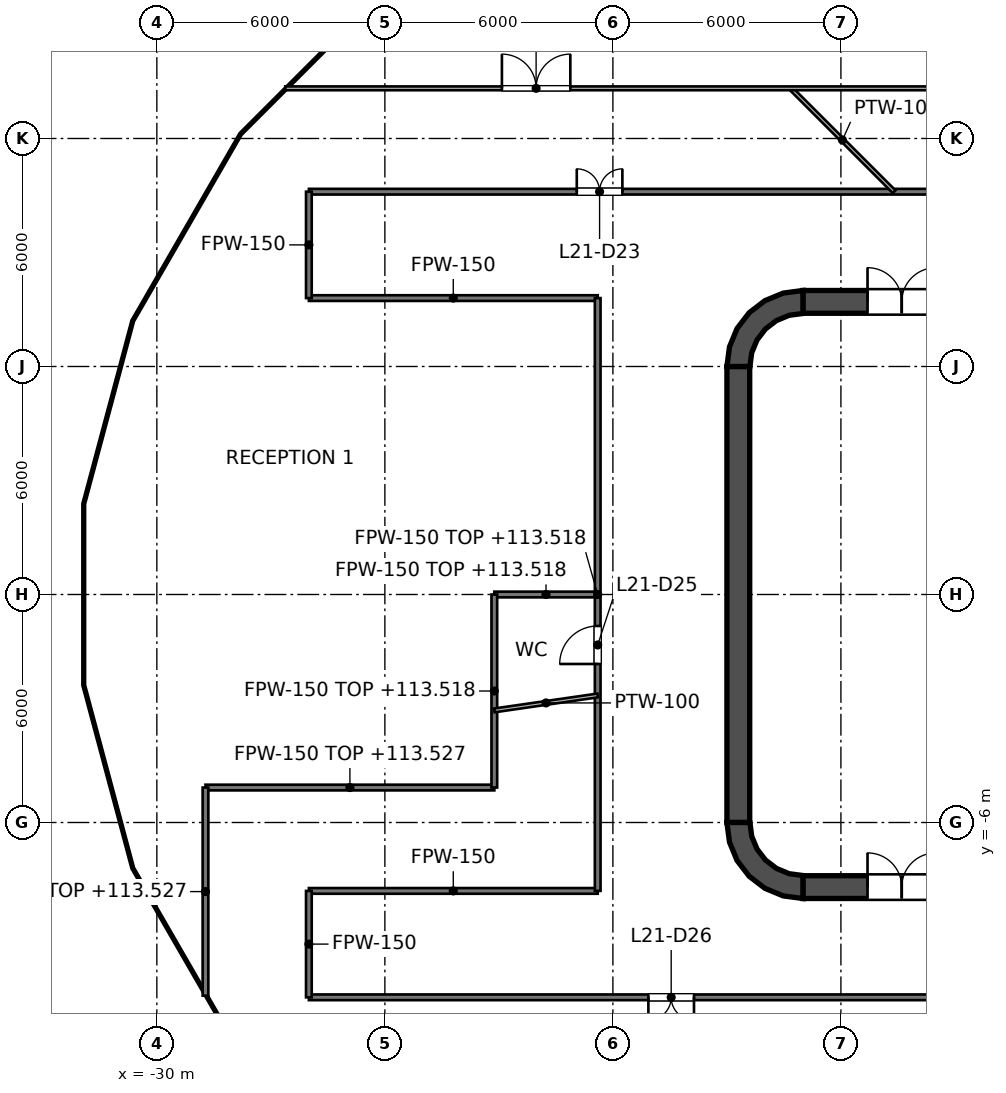
"""IFC4 building model, lengths in metres.
Left out: names, types, materials, properties, quantities, classifications, styles, units other than length and angle.
Written with IfcOpenShell. Run it as: python <this file> out.ifc"""

import sys

from ifc_helpers import new_model, si_unit, direction, frame, frame_2d, origin, place, context, subcontext, project, spatial, polyline, rectangle, outline, extrude, element, fill, save


model = new_model("IFC4")
c1 = context("Model", 3, precision=1e-05, world=origin(), true_north=direction((0.0, 1.0)))
c2 = subcontext(c1, "Body", "Model", "MODEL_VIEW")
j1 = project(units=[si_unit("LENGTHUNIT", "METRE"), si_unit("PLANEANGLEUNIT", "RADIAN")], contexts=[c1])
p1 = place(None, origin())
s1 = spatial("IfcSite", under=j1, at=p1, CompositionType="ELEMENT")
p2 = place(p1, origin())
s2 = spatial("IfcBuilding", under=s1, at=p2, CompositionType="ELEMENT")
p3 = place(p2, frame((0.0, 0.0, 110.4)))
s3 = spatial("IfcBuildingStorey", under=s2, at=p3, CompositionType="ELEMENT", Elevation=110.4)
p4 = place(p3, frame((-13.0, 7.7, 0.0), z_axis=(0.0, 0.0, 1.0), x_axis=(1.0, 0.0, 0.0)))
e1 = element("IfcWall", 1, at=p4, inside=s3, PredefinedType="SHEAR", context=c2, shape_type="SweptSolid", body=[
    extrude(rectangle(XDim=26.0, YDim=0.6, at=frame_2d((13.0, 0.0))), origin(), (0.0, 0.0, 1.0), 4.2),
])
p5 = place(p4, frame((1.7, 0.0, 0.0)))
e2 = element("IfcOpeningElement", 2, at=p5, cuts=e1, PredefinedType="OPENING", context=c2, shape_type="SweptSolid", body=[
    extrude(rectangle(XDim=1.8, YDim=2.1, at=frame_2d((0.9, 1.05))), frame((0.0, 0.3, 0.0), z_axis=(0.0, -1.0, 0.0), x_axis=(1.0, 0.0, 0.0)), (0.0, 0.0, 1.0), 0.6),
])
p6 = place(p4, frame((22.5, 0.0, 0.0)))
e3 = element("IfcOpeningElement", 3, at=p6, cuts=e1, PredefinedType="OPENING", context=c2, shape_type="SweptSolid", body=[
    extrude(rectangle(XDim=1.8, YDim=2.1, at=frame_2d((0.9, 1.05))), frame((0.0, 0.3, 0.0), z_axis=(0.0, -1.0, 0.0), x_axis=(1.0, 0.0, 0.0)), (0.0, 0.0, 1.0), 0.6),
])
p7 = place(p3, frame((-13.0, -7.7, 0.0), z_axis=(0.0, 0.0, 1.0), x_axis=(1.0, 0.0, 0.0)))
e4 = element("IfcWall", 4, at=p7, inside=s3, PredefinedType="SHEAR", context=c2, shape_type="SweptSolid", body=[
    extrude(rectangle(XDim=26.0, YDim=0.6, at=frame_2d((13.0, 0.0))), origin(), (0.0, 0.0, 1.0), 4.2),
])
p8 = place(p7, frame((1.7, 0.0, 0.0)))
e5 = element("IfcOpeningElement", 5, at=p8, cuts=e4, PredefinedType="OPENING", context=c2, shape_type="SweptSolid", body=[
    extrude(rectangle(XDim=1.8, YDim=2.1, at=frame_2d((0.9, 1.05))), frame((0.0, 0.3, 0.0), z_axis=(0.0, -1.0, 0.0), x_axis=(1.0, 0.0, 0.0)), (0.0, 0.0, 1.0), 0.6),
])
p9 = place(p7, frame((22.5, 0.0, 0.0)))
e6 = element("IfcOpeningElement", 6, at=p9, cuts=e4, PredefinedType="OPENING", context=c2, shape_type="SweptSolid", body=[
    extrude(rectangle(XDim=1.8, YDim=2.1, at=frame_2d((0.9, 1.05))), frame((0.0, 0.3, 0.0), z_axis=(0.0, -1.0, 0.0), x_axis=(1.0, 0.0, 0.0)), (0.0, 0.0, 1.0), 0.6),
])
p10 = place(p3, frame((-14.7, -6.0, 0.0), z_axis=(0.0, 0.0, 1.0), x_axis=(0.0, 1.0, 0.0)))
e7 = element("IfcWall", 7, at=p10, inside=s3, PredefinedType="SHEAR", context=c2, shape_type="SweptSolid", body=[
    extrude(rectangle(XDim=12.0, YDim=0.6, at=frame_2d((6.0, 0.0))), origin(), (0.0, 0.0, 1.0), 4.2),
])
p11 = place(p3, origin())
e8 = element("IfcWall", 8, at=p11, inside=s3, PredefinedType="SHEAR", context=c2, shape_type="SweptSolid", body=[
    extrude(outline(polyline([(-15.0, 6.0), (-14.395, 6.0), (-14.347, 6.361), (-14.208, 6.698), (-13.986, 6.986), (-13.698, 7.208), (-13.361, 7.347), (-13.0, 7.395), (-13.0, 8.0), (-13.518, 7.932), (-14.0, 7.732), (-14.414, 7.414), (-14.732, 7.0), (-14.932, 6.518), (-15.0, 6.0)])), origin(), (0.0, 0.0, 1.0), 4.2),
])
e9 = element("IfcWall", 9, at=p11, inside=s3, PredefinedType="SHEAR", context=c2, shape_type="SweptSolid", body=[
    extrude(outline(polyline([(-13.0, -8.0), (-13.0, -7.395), (-13.361, -7.347), (-13.698, -7.208), (-13.986, -6.986), (-14.208, -6.698), (-14.347, -6.361), (-14.395, -6.0), (-15.0, -6.0), (-14.932, -6.518), (-14.732, -7.0), (-14.414, -7.414), (-14.0, -7.732), (-13.518, -7.932), (-13.0, -8.0)])), origin(), (0.0, 0.0, 1.0), 4.2),
])
p12 = place(p3, frame((-11.8, -7.4, 0.0), z_axis=(0.0, 0.0, 1.0), x_axis=(0.0, 1.0, 0.0)))
e10 = element("IfcWall", 10, at=p12, inside=s3, PredefinedType="SOLIDWALL", context=c2, shape_type="SweptSolid", body=[
    extrude(rectangle(XDim=14.8, YDim=0.4, at=frame_2d((7.4, 0.0))), origin(), (0.0, 0.0, 1.0), 4.05),
])
p13 = place(p12, frame((11.2, 0.0, 0.0)))
e11 = element("IfcOpeningElement", 11, at=p13, cuts=e10, PredefinedType="OPENING", context=c2, shape_type="SweptSolid", body=[
    extrude(rectangle(XDim=1.1, YDim=2.1, at=frame_2d((0.55, 1.05))), frame((0.0, 0.2, 0.0), z_axis=(0.0, -1.0, 0.0), x_axis=(1.0, 0.0, 0.0)), (0.0, 0.0, 1.0), 0.4),
])
p14 = place(p12, frame((8.3, 0.0, 0.0)))
e12 = element("IfcOpeningElement", 12, at=p14, cuts=e10, PredefinedType="OPENING", context=c2, shape_type="SweptSolid", body=[
    extrude(rectangle(XDim=1.1, YDim=2.1, at=frame_2d((0.55, 1.05))), frame((0.0, 0.2, 0.0), z_axis=(0.0, -1.0, 0.0), x_axis=(1.0, 0.0, 0.0)), (0.0, 0.0, 1.0), 0.4),
])
p15 = place(p12, frame((5.4, 0.0, 0.0)))
e13 = element("IfcOpeningElement", 13, at=p15, cuts=e10, PredefinedType="OPENING", context=c2, shape_type="SweptSolid", body=[
    extrude(rectangle(XDim=1.1, YDim=2.1, at=frame_2d((0.55, 1.05))), frame((0.0, 0.2, 0.0), z_axis=(0.0, -1.0, 0.0), x_axis=(1.0, 0.0, 0.0)), (0.0, 0.0, 1.0), 0.4),
])
p16 = place(p12, frame((13.552, 0.0, 0.0)))
e14 = element("IfcOpeningElement", 14, at=p16, cuts=e10, PredefinedType="OPENING", context=c2, shape_type="SweptSolid", body=[
    extrude(rectangle(XDim=0.9, YDim=2.1, at=frame_2d((0.45, 1.05))), frame((0.0, 0.2, 0.0), z_axis=(0.0, -1.0, 0.0), x_axis=(1.0, 0.0, 0.0)), (0.0, 0.0, 1.0), 0.4),
])
p17 = place(p12, frame((0.347, 0.0, 0.0)))
e15 = element("IfcOpeningElement", 15, at=p17, cuts=e10, PredefinedType="OPENING", context=c2, shape_type="SweptSolid", body=[
    extrude(rectangle(XDim=0.9, YDim=2.1, at=frame_2d((0.45, 1.05))), frame((0.0, 0.2, 0.0), z_axis=(0.0, -1.0, 0.0), x_axis=(1.0, 0.0, 0.0)), (0.0, 0.0, 1.0), 0.4),
])
e16 = element("IfcWall", 16, at=p11, inside=s3, PredefinedType="SOLIDWALL", context=c2, shape_type="SweptSolid", body=[
    extrude(outline(polyline([(-12.0, -5.925), (-12.0, -5.675), (-14.15, -5.675), (-14.15, -3.025), (-12.0, -3.025), (-12.0, -2.775), (-14.15, -2.775), (-14.15, -0.125), (-12.0, -0.125), (-12.0, 0.125), (-14.15, 0.125), (-14.15, 2.775), (-12.0, 2.775), (-12.0, 3.025), (-14.15, 3.025), (-14.15, 5.675), (-12.0, 5.675), (-12.0, 5.925), (-14.15, 5.925), (-14.4, 5.925), (-14.4, 5.675), (-14.4, 3.025), (-14.4, 2.775), (-14.4, 0.125), (-14.4, -0.125), (-14.4, -2.775), (-14.4, -3.025), (-14.4, -5.675), (-14.4, -5.925), (-14.15, -5.925), (-12.0, -5.925)])), origin(), (0.0, 0.0, 1.0), 4.05),
])
p18 = place(p3, frame((-26.0, -10.6, 0.0), z_axis=(0.0, 0.0, 1.0), x_axis=(1.0, 0.0, 0.0)))
e17 = element("IfcWall", 17, at=p18, inside=s3, PredefinedType="PARTITIONING", context=c2, shape_type="SweptSolid", body=[
    extrude(rectangle(XDim=52.0, YDim=0.15, at=frame_2d((26.0, 0.0))), origin(), (0.0, 0.0, 1.0), 3.127),
])
p19 = place(p18, frame((8.934, 0.0, 0.0)))
e18 = element("IfcOpeningElement", 18, at=p19, cuts=e17, PredefinedType="OPENING", context=c2, shape_type="SweptSolid", body=[
    extrude(rectangle(XDim=1.2, YDim=2.1, at=frame_2d((0.6, 1.05))), frame((0.0, 0.075, 0.0), z_axis=(0.0, -1.0, 0.0), x_axis=(1.0, 0.0, 0.0)), (0.0, 0.0, 1.0), 0.15),
])
p20 = place(p18, frame((19.913, 0.0, 0.0)))
e19 = element("IfcOpeningElement", 19, at=p20, cuts=e17, PredefinedType="OPENING", context=c2, shape_type="SweptSolid", body=[
    extrude(rectangle(XDim=1.0, YDim=2.1, at=frame_2d((0.5, 1.05))), frame((0.0, 0.075, 0.0), z_axis=(0.0, -1.0, 0.0), x_axis=(1.0, 0.0, 0.0)), (0.0, 0.0, 1.0), 0.15),
])
p21 = place(p18, frame((21.763, 0.0, 0.0)))
e20 = element("IfcOpeningElement", 20, at=p21, cuts=e17, PredefinedType="OPENING", context=c2, shape_type="SweptSolid", body=[
    extrude(rectangle(XDim=1.0, YDim=2.1, at=frame_2d((0.5, 1.05))), frame((0.0, 0.075, 0.0), z_axis=(0.0, -1.0, 0.0), x_axis=(1.0, 0.0, 0.0)), (0.0, 0.0, 1.0), 0.15),
])
p22 = place(p18, frame((29.38, 0.0, 0.0)))
e21 = element("IfcOpeningElement", 21, at=p22, cuts=e17, PredefinedType="OPENING", context=c2, shape_type="SweptSolid", body=[
    extrude(rectangle(XDim=1.0, YDim=2.1, at=frame_2d((0.5, 1.05))), frame((0.0, 0.075, 0.0), z_axis=(0.0, -1.0, 0.0), x_axis=(1.0, 0.0, 0.0)), (0.0, 0.0, 1.0), 0.15),
])
p23 = place(p18, frame((41.202, 0.0, 0.0)))
e22 = element("IfcOpeningElement", 22, at=p23, cuts=e17, PredefinedType="OPENING", context=c2, shape_type="SweptSolid", body=[
    extrude(rectangle(XDim=1.0, YDim=2.1, at=frame_2d((0.5, 1.05))), frame((0.0, 0.075, 0.0), z_axis=(0.0, -1.0, 0.0), x_axis=(1.0, 0.0, 0.0)), (0.0, 0.0, 1.0), 0.15),
])
p24 = place(p3, frame((-26.0, -7.8, 0.0), z_axis=(0.0, 0.0, 1.0), x_axis=(1.0, 0.0, 0.0)))
e23 = element("IfcWall", 23, at=p24, inside=s3, PredefinedType="PARTITIONING", context=c2, shape_type="SweptSolid", body=[
    extrude(rectangle(XDim=7.6, YDim=0.15, at=frame_2d((3.8, 0.0))), origin(), (0.0, 0.0, 1.0), 3.195),
])
p25 = place(p3, frame((-28.72, -5.08, 0.0), z_axis=(0.0, 0.0, 1.0), x_axis=(1.0, 0.0, 0.0)))
e24 = element("IfcWall", 24, at=p25, inside=s3, PredefinedType="PARTITIONING", context=c2, shape_type="SweptSolid", body=[
    extrude(rectangle(XDim=7.6, YDim=0.15, at=frame_2d((3.8, 0.0))), origin(), (0.0, 0.0, 1.0), 3.127),
])
p26 = place(p3, frame((-21.12, 0.0, 0.0), z_axis=(0.0, 0.0, 1.0), x_axis=(1.0, 0.0, 0.0)))
e25 = element("IfcWall", 25, at=p26, inside=s3, PredefinedType="PARTITIONING", context=c2, shape_type="SweptSolid", body=[
    extrude(rectangle(XDim=2.72, YDim=0.15, at=frame_2d((1.36, 0.0))), origin(), (0.0, 0.0, 1.0), 3.118),
])
p27 = place(p3, frame((-26.0, 7.8, 0.0), z_axis=(0.0, 0.0, 1.0), x_axis=(1.0, 0.0, 0.0)))
e26 = element("IfcWall", 26, at=p27, inside=s3, PredefinedType="PARTITIONING", context=c2, shape_type="SweptSolid", body=[
    extrude(rectangle(XDim=7.6, YDim=0.15, at=frame_2d((3.8, 0.0))), origin(), (0.0, 0.0, 1.0), 3.195),
])
p28 = place(p3, frame((-26.0, 10.6, 0.0), z_axis=(0.0, 0.0, 1.0), x_axis=(1.0, 0.0, 0.0)))
e27 = element("IfcWall", 27, at=p28, inside=s3, PredefinedType="PARTITIONING", context=c2, shape_type="SweptSolid", body=[
    extrude(rectangle(XDim=52.0, YDim=0.15, at=frame_2d((26.0, 0.0))), origin(), (0.0, 0.0, 1.0), 3.127),
])
p29 = place(p28, frame((18.729, 0.0, 0.0)))
e28 = element("IfcOpeningElement", 28, at=p29, cuts=e27, PredefinedType="OPENING", context=c2, shape_type="SweptSolid", body=[
    extrude(rectangle(XDim=1.0, YDim=2.1, at=frame_2d((0.5, 1.05))), frame((0.0, 0.075, 0.0), z_axis=(0.0, -1.0, 0.0), x_axis=(1.0, 0.0, 0.0)), (0.0, 0.0, 1.0), 0.15),
])
p30 = place(p28, frame((7.05, 0.0, 0.0)))
e29 = element("IfcOpeningElement", 29, at=p30, cuts=e27, PredefinedType="OPENING", context=c2, shape_type="SweptSolid", body=[
    extrude(rectangle(XDim=1.2, YDim=2.1, at=frame_2d((0.6, 1.05))), frame((0.0, 0.075, 0.0), z_axis=(0.0, -1.0, 0.0), x_axis=(1.0, 0.0, 0.0)), (0.0, 0.0, 1.0), 0.15),
])
p31 = place(p28, frame((40.464, 0.0, 0.0)))
e30 = element("IfcOpeningElement", 30, at=p31, cuts=e27, PredefinedType="OPENING", context=c2, shape_type="SweptSolid", body=[
    extrude(rectangle(XDim=1.0, YDim=2.1, at=frame_2d((0.5, 1.05))), frame((0.0, 0.075, 0.0), z_axis=(0.0, -1.0, 0.0), x_axis=(1.0, 0.0, 0.0)), (0.0, 0.0, 1.0), 0.15),
])
p32 = place(p28, frame((27.09, 0.0, 0.0)))
e31 = element("IfcOpeningElement", 31, at=p32, cuts=e27, PredefinedType="OPENING", context=c2, shape_type="SweptSolid", body=[
    extrude(rectangle(XDim=1.0, YDim=2.1, at=frame_2d((0.5, 1.05))), frame((0.0, 0.075, 0.0), z_axis=(0.0, -1.0, 0.0), x_axis=(1.0, 0.0, 0.0)), (0.0, 0.0, 1.0), 0.15),
])
p33 = place(p3, frame((-18.4, -7.8, 0.0), z_axis=(0.0, 0.0, 1.0), x_axis=(0.0, 1.0, 0.0)))
e32 = element("IfcWall", 32, at=p33, inside=s3, PredefinedType="PARTITIONING", context=c2, shape_type="SweptSolid", body=[
    extrude(rectangle(XDim=15.6, YDim=0.15, at=frame_2d((7.8, 0.0))), origin(), (0.0, 0.0, 1.0), 3.118),
])
p34 = place(p33, frame((5.971, 0.0, 0.0)))
e33 = element("IfcOpeningElement", 33, at=p34, cuts=e32, PredefinedType="OPENING", context=c2, shape_type="SweptSolid", body=[
    extrude(rectangle(XDim=1.0, YDim=2.1, at=frame_2d((0.5, 1.05))), frame((0.0, 0.075, 0.0), z_axis=(0.0, -1.0, 0.0), x_axis=(1.0, 0.0, 0.0)), (0.0, 0.0, 1.0), 0.15),
])
p35 = place(p3, frame((-21.12, -5.08, 0.0), z_axis=(0.0, 0.0, 1.0), x_axis=(0.0, 1.0, 0.0)))
e34 = element("IfcWall", 34, at=p35, inside=s3, PredefinedType="PARTITIONING", context=c2, shape_type="SweptSolid", body=[
    extrude(rectangle(XDim=5.08, YDim=0.15, at=frame_2d((2.54, 0.0))), origin(), (0.0, 0.0, 1.0), 3.118),
])
for number, where, z_axis, x_axis in (
    (35, (-26.0, -10.6, 0.0), (0.0, 0.0, 1.0), (0.0, 1.0, 0.0)),
    (36, (-26.0, 7.8, 0.0), (0.0, 0.0, 1.0), (0.0, 1.0, 0.0)),
):
    element("IfcWall", number, at=place(p3, frame(where, z_axis=z_axis, x_axis=x_axis)), inside=s3, PredefinedType="PARTITIONING", context=c2, shape_type="SweptSolid", body=[
        extrude(rectangle(XDim=2.8, YDim=0.15, at=frame_2d((1.4, 0.0))), origin(), (0.0, 0.0, 1.0), 3.195),
    ])
p36 = place(p3, frame((-28.72, -10.556, 0.0), z_axis=(0.0, 0.0, 1.0), x_axis=(0.0, 1.0, 0.0)))
e37 = element("IfcWall", 37, at=p36, inside=s3, PredefinedType="PARTITIONING", context=c2, shape_type="SweptSolid", body=[
    extrude(rectangle(XDim=5.476, YDim=0.15, at=frame_2d((2.738, 0.0))), origin(), (0.0, 0.0, 1.0), 3.127),
])
p37 = place(p3, frame((-13.32, 13.32, 0.0), z_axis=(0.0, 0.0, 1.0), x_axis=(0.707106781187, -0.707106781187, 0.0)))
e38 = element("IfcWall", 38, at=p37, inside=s3, PredefinedType="PARTITIONING", context=c2, shape_type="SweptSolid", body=[
    extrude(rectangle(XDim=3.847, YDim=0.1, at=frame_2d((1.923, 0.0))), origin(), (0.0, 0.0, 1.0), 3.127),
])
p38 = place(p3, frame((-26.621, 13.32, 0.0), z_axis=(0.0, 0.0, 1.0), x_axis=(1.0, 0.0, 0.0)))
e39 = element("IfcWall", 39, at=p38, inside=s3, PredefinedType="PARTITIONING", context=c2, shape_type="SweptSolid", body=[
    extrude(rectangle(XDim=53.242, YDim=0.1, at=frame_2d((26.621, 0.0))), origin(), (0.0, 0.0, 1.0), 3.127),
])
p39 = place(p38, frame((5.7, 0.0, 0.0)))
e40 = element("IfcOpeningElement", 40, at=p39, cuts=e39, PredefinedType="OPENING", context=c2, shape_type="SweptSolid", body=[
    extrude(rectangle(XDim=1.8, YDim=2.1, at=frame_2d((0.9, 1.05))), frame((0.0, 0.05, 0.0), z_axis=(0.0, -1.0, 0.0), x_axis=(1.0, 0.0, 0.0)), (0.0, 0.0, 1.0), 0.1),
])
p40 = place(p38, frame((43.326, 0.0, 0.0)))
e41 = element("IfcOpeningElement", 41, at=p40, cuts=e39, PredefinedType="OPENING", context=c2, shape_type="SweptSolid", body=[
    extrude(rectangle(XDim=0.9, YDim=2.1, at=frame_2d((0.45, 1.05))), frame((0.0, 0.05, 0.0), z_axis=(0.0, -1.0, 0.0), x_axis=(1.0, 0.0, 0.0)), (0.0, 0.0, 1.0), 0.1),
])
p41 = place(p38, frame((27.781, 0.0, 0.0)))
e42 = element("IfcOpeningElement", 42, at=p41, cuts=e39, PredefinedType="OPENING", context=c2, shape_type="SweptSolid", body=[
    extrude(rectangle(XDim=1.8, YDim=2.1, at=frame_2d((0.9, 1.05))), frame((0.0, 0.05, 0.0), z_axis=(0.0, -1.0, 0.0), x_axis=(1.0, 0.0, 0.0)), (0.0, 0.0, 1.0), 0.1),
])
p42 = place(p3, frame((-21.12, -3.05, 0.0), z_axis=(0.0, 0.0, 1.0), x_axis=(0.989720814385, 0.143012969948, 0.0)))
e43 = element("IfcWall", 43, at=p42, inside=s3, PredefinedType="PARTITIONING", context=c2, shape_type="SweptSolid", body=[
    extrude(rectangle(XDim=2.749, YDim=0.1, at=frame_2d((1.374, 0.0))), origin(), (0.0, 0.0, 1.0), 3.127),
])
p43 = place(p13, origin())
e44 = element("IfcDoor", 44, at=p43, inside=s3, OperationType="DOUBLE_DOOR_SLIDING", PredefinedType="DOOR", context=c2, shape_type="SweptSolid", body=[
    extrude(rectangle(XDim=1.1, YDim=2.1, at=frame_2d((0.55, 1.05))), frame((0.0, 0.025, 0.0), z_axis=(0.0, -1.0, 0.0), x_axis=(1.0, 0.0, 0.0)), (0.0, 0.0, 1.0), 0.05),
])
fill(e11, e44)
p44 = place(p14, origin())
e45 = element("IfcDoor", 45, at=p44, inside=s3, OperationType="DOUBLE_DOOR_SLIDING", PredefinedType="DOOR", context=c2, shape_type="SweptSolid", body=[
    extrude(rectangle(XDim=1.1, YDim=2.1, at=frame_2d((0.55, 1.05))), frame((0.0, 0.025, 0.0), z_axis=(0.0, -1.0, 0.0), x_axis=(1.0, 0.0, 0.0)), (0.0, 0.0, 1.0), 0.05),
])
fill(e12, e45)
p45 = place(p15, origin())
e46 = element("IfcDoor", 46, at=p45, inside=s3, OperationType="DOUBLE_DOOR_SLIDING", PredefinedType="DOOR", context=c2, shape_type="SweptSolid", body=[
    extrude(rectangle(XDim=1.1, YDim=2.1, at=frame_2d((0.55, 1.05))), frame((0.0, 0.025, 0.0), z_axis=(0.0, -1.0, 0.0), x_axis=(1.0, 0.0, 0.0)), (0.0, 0.0, 1.0), 0.05),
])
fill(e13, e46)
p46 = place(p16, origin())
e47 = element("IfcDoor", 47, at=p46, inside=s3, OperationType="SINGLE_SWING_LEFT", PredefinedType="DOOR", context=c2, shape_type="SweptSolid", body=[
    extrude(rectangle(XDim=0.9, YDim=2.1, at=frame_2d((0.45, 1.05))), frame((0.0, 0.025, 0.0), z_axis=(0.0, -1.0, 0.0), x_axis=(1.0, 0.0, 0.0)), (0.0, 0.0, 1.0), 0.05),
])
fill(e14, e47)
p47 = place(p17, origin())
e48 = element("IfcDoor", 48, at=p47, inside=s3, OperationType="SINGLE_SWING_LEFT", PredefinedType="DOOR", context=c2, shape_type="SweptSolid", body=[
    extrude(rectangle(XDim=0.9, YDim=2.1, at=frame_2d((0.45, 1.05))), frame((0.0, 0.025, 0.0), z_axis=(0.0, -1.0, 0.0), x_axis=(1.0, 0.0, 0.0)), (0.0, 0.0, 1.0), 0.05),
])
fill(e15, e48)
p48 = place(p5, origin())
e49 = element("IfcDoor", 49, at=p48, inside=s3, OperationType="DOUBLE_DOOR_SINGLE_SWING", PredefinedType="DOOR", context=c2, shape_type="SweptSolid", body=[
    extrude(rectangle(XDim=1.8, YDim=2.1, at=frame_2d((0.9, 1.05))), frame((0.0, 0.025, 0.0), z_axis=(0.0, -1.0, 0.0), x_axis=(1.0, 0.0, 0.0)), (0.0, 0.0, 1.0), 0.05),
])
fill(e2, e49)
p49 = place(p8, origin())
e50 = element("IfcDoor", 50, at=p49, inside=s3, OperationType="DOUBLE_DOOR_SINGLE_SWING", PredefinedType="DOOR", context=c2, shape_type="SweptSolid", body=[
    extrude(rectangle(XDim=1.8, YDim=2.1, at=frame_2d((0.9, 1.05))), frame((0.0, 0.025, 0.0), z_axis=(0.0, -1.0, 0.0), x_axis=(1.0, 0.0, 0.0)), (0.0, 0.0, 1.0), 0.05),
])
fill(e5, e50)
p50 = place(p30, origin())
e51 = element("IfcDoor", 51, at=p50, inside=s3, OperationType="DOUBLE_DOOR_SINGLE_SWING", PredefinedType="DOOR", context=c2, shape_type="SweptSolid", body=[
    extrude(rectangle(XDim=1.2, YDim=2.1, at=frame_2d((0.6, 1.05))), frame((0.0, 0.025, 0.0), z_axis=(0.0, -1.0, 0.0), x_axis=(1.0, 0.0, 0.0)), (0.0, 0.0, 1.0), 0.05),
])
fill(e29, e51)
p51 = place(p39, origin())
e52 = element("IfcDoor", 52, at=p51, inside=s3, OperationType="DOUBLE_DOOR_SINGLE_SWING", PredefinedType="DOOR", context=c2, shape_type="SweptSolid", body=[
    extrude(rectangle(XDim=1.8, YDim=2.1, at=frame_2d((0.9, 1.05))), frame((0.0, 0.025, 0.0), z_axis=(0.0, -1.0, 0.0), x_axis=(1.0, 0.0, 0.0)), (0.0, 0.0, 1.0), 0.05),
])
fill(e40, e52)
p52 = place(p34, origin())
e53 = element("IfcDoor", 53, at=p52, inside=s3, OperationType="SINGLE_SWING_LEFT", PredefinedType="DOOR", context=c2, shape_type="SweptSolid", body=[
    extrude(rectangle(XDim=1.0, YDim=2.1, at=frame_2d((0.5, 1.05))), frame((0.0, 0.025, 0.0), z_axis=(0.0, -1.0, 0.0), x_axis=(1.0, 0.0, 0.0)), (0.0, 0.0, 1.0), 0.05),
])
fill(e33, e53)
p53 = place(p19, origin())
e54 = element("IfcDoor", 54, at=p53, inside=s3, OperationType="DOUBLE_DOOR_SINGLE_SWING", PredefinedType="DOOR", context=c2, shape_type="SweptSolid", body=[
    extrude(rectangle(XDim=1.2, YDim=2.1, at=frame_2d((0.6, 1.05))), frame((0.0, 0.025, 0.0), z_axis=(0.0, -1.0, 0.0), x_axis=(1.0, 0.0, 0.0)), (0.0, 0.0, 1.0), 0.05),
])
fill(e18, e54)
save(model, sys.argv[1])
